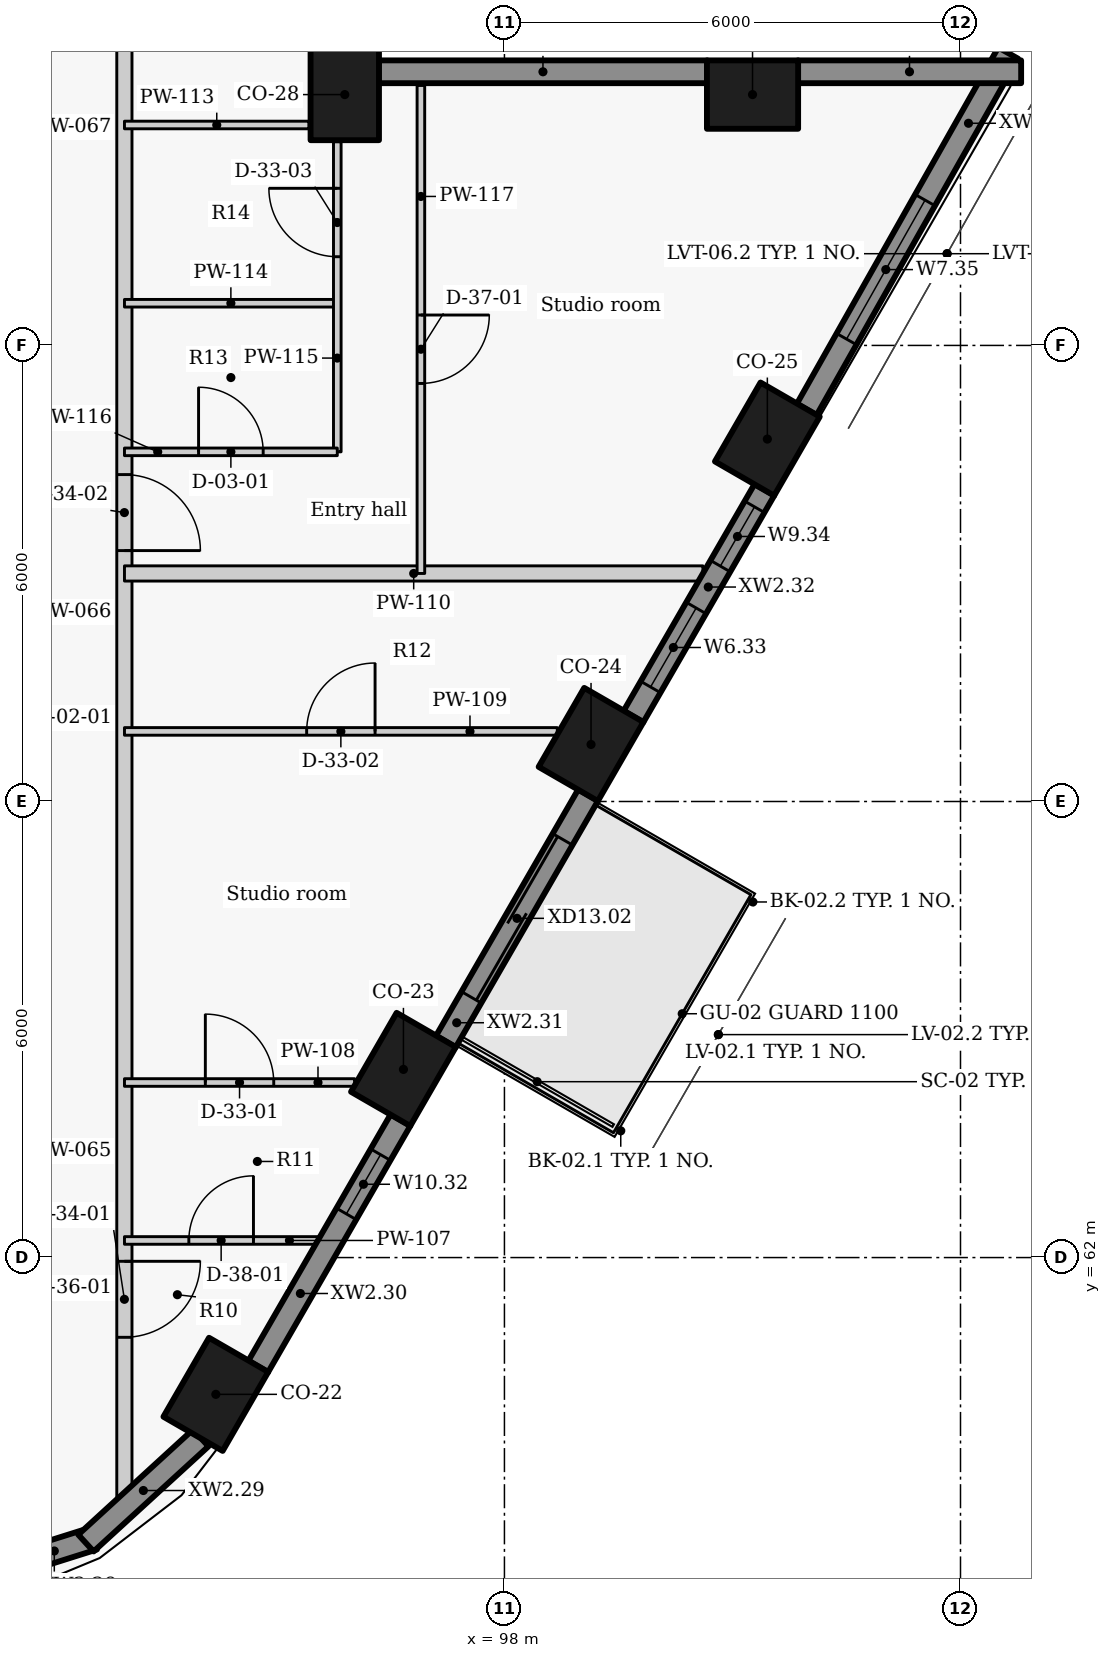
"""IFC4 building model, lengths in metres.
Left out: names, types, materials, properties, quantities, classifications, styles, units other than length and angle.
Written with IfcOpenShell. Run it as: python <this file> out.ifc"""

import sys

from ifc_helpers import new_model, si_unit, direction, frame, frame_2d, origin, origin_2d, place, context, subcontext, project, spatial, rectangle, extrude, element, fill, save


model = new_model("IFC4")
c1 = context("Model", 3, precision=1e-05, world=origin(), true_north=direction((0.0, 1.0)))
c2 = subcontext(c1, "Body", "Model", "MODEL_VIEW")
j1 = project(units=[si_unit("LENGTHUNIT", "METRE"), si_unit("PLANEANGLEUNIT", "RADIAN")], contexts=[c1])
p1 = place(None, origin())
s1 = spatial("IfcSite", under=j1, at=p1, CompositionType="ELEMENT")
p2 = place(p1, origin())
s2 = spatial("IfcBuilding", under=s1, at=p2, CompositionType="ELEMENT")
p3 = place(p2, frame((0.0, 0.0, 216.3)))
s3 = spatial("IfcBuildingStorey", under=s2, at=p3, CompositionType="ELEMENT", Elevation=216.3)
for number, where, z_axis, x_axis in (
    (1, (94.203, 60.2, 0.0), (0.0, 0.0, 1.0), (0.5, 0.866, 0.0)),
    (2, (96.671, 64.475, 0.0), (0.0, 0.0, 1.0), (0.5, 0.866, 0.0)),
    (3, (99.139, 68.75, 0.0), (0.0, 0.0, 1.0), (0.5, 0.866, 0.0)),
    (4, (101.459, 72.768, 0.0), (0.0, 0.0, 1.0), (0.5, 0.866, 0.0)),
    (5, (101.264, 77.3, 0.0), (0.0, 0.0, 1.0), (-1.0, 0.0, 0.0)),
    (6, (95.899, 77.3, 0.0), (0.0, 0.0, 1.0), (0.0, 1.0, 0.0)),
):
    element("IfcColumn", number, at=place(p3, frame(where, z_axis=z_axis, x_axis=x_axis)), inside=s3, PredefinedType="COLUMN", context=c2, shape_type="SweptSolid", body=[
        extrude(rectangle(XDim=1.2, YDim=0.9, at=origin_2d()), origin(), (0.0, 0.0, 1.0), 3.3),
    ])
p4 = place(p3, frame((90.636, 57.685, 0.0), z_axis=(0.0, 0.0, 1.0), x_axis=(0.95368324118, 0.300812691707, 0.0)))
e7 = element("IfcWall", 7, at=p4, inside=s3, PredefinedType="SOLIDWALL", context=c2, shape_type="SweptSolid", body=[
    extrude(rectangle(XDim=2.053, YDim=0.3, at=frame_2d((1.027, 0.0))), origin(), (0.0, 0.0, 1.0), 2.05),
])
p5 = place(p4, frame((0.271, 0.0, 0.9)))
e8 = element("IfcOpeningElement", 8, at=p5, cuts=e7, PredefinedType="OPENING", context=c2, shape_type="SweptSolid", body=[
    extrude(rectangle(XDim=0.6, YDim=1.1, at=frame_2d((0.3, 0.55))), frame((0.0, 0.16, 0.0), z_axis=(0.0, -1.0, 0.0), x_axis=(1.0, 0.0, 0.0)), (0.0, 0.0, 1.0), 0.32),
])
p6 = place(p3, frame((92.494, 58.244, 0.0), z_axis=(0.0, 0.0, 1.0), x_axis=(0.73764876128, 0.675184645102, 0.0)))
e9 = element("IfcWall", 9, at=p6, inside=s3, PredefinedType="SOLIDWALL", context=c2, shape_type="SweptSolid", body=[
    extrude(rectangle(XDim=2.048, YDim=0.3, at=frame_2d((1.024, 0.0))), origin(), (0.0, 0.0, 1.0), 2.05),
])
p7 = place(p3, frame((94.761, 60.567, 0.0), z_axis=(0.0, 0.0, 1.0), x_axis=(0.499982088007, 0.866035745032, 0.0)))
e10 = element("IfcWall", 10, at=p7, inside=s3, PredefinedType="SOLIDWALL", context=c2, shape_type="SweptSolid", body=[
    extrude(rectangle(XDim=3.744, YDim=0.3, at=frame_2d((1.872, 0.0))), origin(), (0.0, 0.0, 1.0), 2.05),
])
p8 = place(p7, frame((2.319, 0.0, 1.5)))
e11 = element("IfcOpeningElement", 11, at=p8, cuts=e10, PredefinedType="OPENING", context=c2, shape_type="SweptSolid", body=[
    extrude(rectangle(XDim=0.9, YDim=0.5, at=frame_2d((0.45, 0.25))), frame((0.0, 0.16, 0.0), z_axis=(0.0, -1.0, 0.0), x_axis=(1.0, 0.0, 0.0)), (0.0, 0.0, 1.0), 0.32),
])
p9 = place(p3, frame((97.229, 64.842, 0.0), z_axis=(0.0, 0.0, 1.0), x_axis=(0.500059225181, 0.86599120741, 0.0)))
e12 = element("IfcWall", 12, at=p9, inside=s3, PredefinedType="SOLIDWALL", context=c2, shape_type="SweptSolid", body=[
    extrude(rectangle(XDim=3.744, YDim=0.3, at=frame_2d((1.872, 0.0))), origin(), (0.0, 0.0, 1.0), 2.05),
])
p10 = place(p9, frame((0.672, 0.0, 0.0)))
e13 = element("IfcOpeningElement", 13, at=p10, cuts=e12, PredefinedType="OPENING", context=c2, shape_type="SweptSolid", body=[
    extrude(rectangle(XDim=2.4, YDim=2.0, at=frame_2d((1.2, 1.0))), frame((0.0, 0.16, 0.0), z_axis=(0.0, -1.0, 0.0), x_axis=(1.0, 0.0, 0.0)), (0.0, 0.0, 1.0), 0.32),
])
p11 = place(p3, frame((99.697, 69.116, 0.0), z_axis=(0.0, 0.0, 1.0), x_axis=(0.499955427682, 0.866051136095, 0.0)))
e14 = element("IfcWall", 14, at=p11, inside=s3, PredefinedType="SOLIDWALL", context=c2, shape_type="SweptSolid", body=[
    extrude(rectangle(XDim=3.447, YDim=0.3, at=frame_2d((1.724, 0.0))), origin(), (0.0, 0.0, 1.0), 2.05),
])
p12 = place(p11, frame((0.45, 0.0, 0.9)))
e15 = element("IfcOpeningElement", 15, at=p12, cuts=e14, PredefinedType="OPENING", context=c2, shape_type="SweptSolid", body=[
    extrude(rectangle(XDim=1.2, YDim=1.1, at=frame_2d((0.6, 0.55))), frame((0.0, 0.16, 0.0), z_axis=(0.0, -1.0, 0.0), x_axis=(1.0, 0.0, 0.0)), (0.0, 0.0, 1.0), 0.32),
])
p13 = place(p11, frame((2.287, 0.0, 0.9)))
e16 = element("IfcOpeningElement", 16, at=p13, cuts=e14, PredefinedType="OPENING", context=c2, shape_type="SweptSolid", body=[
    extrude(rectangle(XDim=0.9, YDim=1.1, at=frame_2d((0.45, 0.55))), frame((0.0, 0.16, 0.0), z_axis=(0.0, -1.0, 0.0), x_axis=(1.0, 0.0, 0.0)), (0.0, 0.0, 1.0), 0.32),
])
p14 = place(p3, frame((101.977, 73.157, 0.0), z_axis=(0.0, 0.0, 1.0), x_axis=(0.492033360928, 0.870576344575, 0.0)))
e17 = element("IfcWall", 17, at=p14, inside=s3, PredefinedType="SOLIDWALL", context=c2, shape_type="SweptSolid", body=[
    extrude(rectangle(XDim=5.387, YDim=0.3, at=frame_2d((2.693, 0.0))), origin(), (0.0, 0.0, 1.0), 2.05),
])
p15 = place(p14, frame((1.064, 0.0, 0.9)))
e18 = element("IfcOpeningElement", 18, at=p15, cuts=e17, PredefinedType="OPENING", context=c2, shape_type="SweptSolid", body=[
    extrude(rectangle(XDim=2.1, YDim=1.1, at=frame_2d((1.05, 0.55))), frame((0.0, 0.16, 0.0), z_axis=(0.0, -1.0, 0.0), x_axis=(1.0, 0.0, 0.0)), (0.0, 0.0, 1.0), 0.32),
])
p16 = place(p3, frame((104.798, 77.6, 0.0), z_axis=(0.0, 0.0, 1.0), x_axis=(-1.0, 0.0, 0.0)))
e19 = element("IfcWall", 19, at=p16, inside=s3, PredefinedType="SOLIDWALL", context=c2, shape_type="SweptSolid", body=[
    extrude(rectangle(XDim=2.938, YDim=0.3, at=frame_2d((1.469, 0.0))), origin(), (0.0, 0.0, 1.0), 2.05),
])
p17 = place(p3, frame((100.668, 77.6, 0.0), z_axis=(0.0, 0.0, 1.0), x_axis=(-1.0, 0.0, 0.0)))
e20 = element("IfcWall", 20, at=p17, inside=s3, PredefinedType="SOLIDWALL", context=c2, shape_type="SweptSolid", body=[
    extrude(rectangle(XDim=4.323, YDim=0.3, at=frame_2d((2.161, 0.0))), origin(), (0.0, 0.0, 1.0), 2.05),
])
p18 = place(p3, frame((93.0, 101.281, 0.0), z_axis=(0.0, 0.0, 1.0), x_axis=(0.0, -1.0, 0.0)))
e21 = element("IfcWall", 21, at=p18, inside=s3, PredefinedType="PARTITIONING", context=c2, shape_type="SweptSolid", body=[
    extrude(rectangle(XDim=42.606, YDim=0.2, at=frame_2d((21.303, 0.0))), origin(), (0.0, 0.0, 1.0), 2.03),
])
p19 = place(p18, frame((39.33, 0.0, 0.0)))
e22 = element("IfcOpeningElement", 22, at=p19, cuts=e21, PredefinedType="OPENING", context=c2, shape_type="SweptSolid", body=[
    extrude(rectangle(XDim=1.0, YDim=2.01, at=frame_2d((0.5, 1.005))), frame((0.0, 0.11, 0.0), z_axis=(0.0, -1.0, 0.0), x_axis=(1.0, 0.0, 0.0)), (0.0, 0.0, 1.0), 0.22),
])
p20 = place(p18, frame((28.98, 0.0, 0.0)))
e23 = element("IfcOpeningElement", 23, at=p20, cuts=e21, PredefinedType="OPENING", context=c2, shape_type="SweptSolid", body=[
    extrude(rectangle(XDim=1.0, YDim=2.01, at=frame_2d((0.5, 1.005))), frame((0.0, 0.11, 0.0), z_axis=(0.0, -1.0, 0.0), x_axis=(1.0, 0.0, 0.0)), (0.0, 0.0, 1.0), 0.22),
])
p21 = place(p18, frame((6.893, 0.0, 0.0)))
e24 = element("IfcOpeningElement", 24, at=p21, cuts=e21, PredefinedType="OPENING", context=c2, shape_type="SweptSolid", body=[
    extrude(rectangle(XDim=1.0, YDim=2.01, at=frame_2d((0.5, 1.005))), frame((0.0, 0.11, 0.0), z_axis=(0.0, -1.0, 0.0), x_axis=(1.0, 0.0, 0.0)), (0.0, 0.0, 1.0), 0.22),
])
p22 = place(p18, frame((19.08, 0.0, 0.0)))
e25 = element("IfcOpeningElement", 25, at=p22, cuts=e21, PredefinedType="OPENING", context=c2, shape_type="SweptSolid", body=[
    extrude(rectangle(XDim=1.0, YDim=2.01, at=frame_2d((0.5, 1.005))), frame((0.0, 0.11, 0.0), z_axis=(0.0, -1.0, 0.0), x_axis=(1.0, 0.0, 0.0)), (0.0, 0.0, 1.0), 0.22),
])
p23 = place(p3, frame((93.001, 62.225, 0.0), z_axis=(0.0, 0.0, 1.0), x_axis=(1.0, 0.0, 0.0)))
e26 = element("IfcWall", 26, at=p23, inside=s3, PredefinedType="PARTITIONING", context=c2, shape_type="SweptSolid", body=[
    extrude(rectangle(XDim=2.544, YDim=0.1, at=frame_2d((1.272, 0.0))), origin(), (0.0, 0.0, 1.0), 2.03),
])
p24 = place(p23, frame((0.847, 0.0, 0.0)))
e27 = element("IfcOpeningElement", 27, at=p24, cuts=e26, PredefinedType="OPENING", context=c2, shape_type="SweptSolid", body=[
    extrude(rectangle(XDim=0.85, YDim=2.01, at=frame_2d((0.425, 1.005))), frame((0.0, 0.06, 0.0), z_axis=(0.0, -1.0, 0.0), x_axis=(1.0, 0.0, 0.0)), (0.0, 0.0, 1.0), 0.12),
])
p25 = place(p3, frame((93.001, 64.303, 0.0), z_axis=(0.0, 0.0, 1.0), x_axis=(1.0, 0.0, 0.0)))
e28 = element("IfcWall", 28, at=p25, inside=s3, PredefinedType="PARTITIONING", context=c2, shape_type="SweptSolid", body=[
    extrude(rectangle(XDim=3.028, YDim=0.1, at=frame_2d((1.514, 0.0))), origin(), (0.0, 0.0, 1.0), 2.95),
])
p26 = place(p25, frame((1.064, 0.0, 0.0)))
e29 = element("IfcOpeningElement", 29, at=p26, cuts=e28, PredefinedType="OPENING", context=c2, shape_type="SweptSolid", body=[
    extrude(rectangle(XDim=0.9, YDim=2.1, at=frame_2d((0.45, 1.05))), frame((0.0, 0.06, 0.0), z_axis=(0.0, -1.0, 0.0), x_axis=(1.0, 0.0, 0.0)), (0.0, 0.0, 1.0), 0.12),
])
p27 = place(p3, frame((93.001, 68.922, 0.0), z_axis=(0.0, 0.0, 1.0), x_axis=(1.0, 0.0, 0.0)))
e30 = element("IfcWall", 30, at=p27, inside=s3, PredefinedType="PARTITIONING", context=c2, shape_type="SweptSolid", body=[
    extrude(rectangle(XDim=5.695, YDim=0.1, at=frame_2d((2.847, 0.0))), origin(), (0.0, 0.0, 1.0), 2.95),
])
p28 = place(p27, frame((2.397, 0.0, 0.0)))
e31 = element("IfcOpeningElement", 31, at=p28, cuts=e30, PredefinedType="OPENING", context=c2, shape_type="SweptSolid", body=[
    extrude(rectangle(XDim=0.9, YDim=2.1, at=frame_2d((0.45, 1.05))), frame((0.0, 0.06, 0.0), z_axis=(0.0, -1.0, 0.0), x_axis=(1.0, 0.0, 0.0)), (0.0, 0.0, 1.0), 0.12),
])
p29 = place(p3, frame((93.001, 71.0, 0.0), z_axis=(0.0, 0.0, 1.0), x_axis=(1.0, 0.0, 0.0)))
e32 = element("IfcWall", 32, at=p29, inside=s3, PredefinedType="PARTITIONING", context=c2, shape_type="SweptSolid", body=[
    extrude(rectangle(XDim=7.61, YDim=0.2, at=frame_2d((3.805, 0.0))), origin(), (0.0, 0.0, 1.0), 2.03),
])
p30 = place(p3, frame((93.001, 76.9, 0.0), z_axis=(0.0, 0.0, 1.0), x_axis=(1.0, 0.0, 0.0)))
e33 = element("IfcWall", 33, at=p30, inside=s3, PredefinedType="PARTITIONING", context=c2, shape_type="SweptSolid", body=[
    extrude(rectangle(XDim=2.428, YDim=0.1, at=frame_2d((1.214, 0.0))), origin(), (0.0, 0.0, 1.0), 2.95),
])
p31 = place(p3, frame((93.001, 74.555, 0.0), z_axis=(0.0, 0.0, 1.0), x_axis=(1.0, 0.0, 0.0)))
e34 = element("IfcWall", 34, at=p31, inside=s3, PredefinedType="PARTITIONING", context=c2, shape_type="SweptSolid", body=[
    extrude(rectangle(XDim=2.8, YDim=0.1, at=frame_2d((1.4, 0.0))), origin(), (0.0, 0.0, 1.0), 2.95),
])
p32 = place(p3, frame((95.801, 72.6, 0.0), z_axis=(0.0, 0.0, 1.0), x_axis=(0.0, 1.0, 0.0)))
e35 = element("IfcWall", 35, at=p32, inside=s3, PredefinedType="PARTITIONING", context=c2, shape_type="SweptSolid", body=[
    extrude(rectangle(XDim=4.08, YDim=0.1, at=frame_2d((2.04, 0.0))), origin(), (0.0, 0.0, 1.0), 2.95),
])
p33 = place(p32, frame((2.567, 0.0, 0.0)))
e36 = element("IfcOpeningElement", 36, at=p33, cuts=e35, PredefinedType="OPENING", context=c2, shape_type="SweptSolid", body=[
    extrude(rectangle(XDim=0.9, YDim=2.1, at=frame_2d((0.45, 1.05))), frame((0.0, 0.06, 0.0), z_axis=(0.0, -1.0, 0.0), x_axis=(1.0, 0.0, 0.0)), (0.0, 0.0, 1.0), 0.12),
])
p34 = place(p3, frame((93.001, 72.6, 0.0), z_axis=(0.0, 0.0, 1.0), x_axis=(1.0, 0.0, 0.0)))
e37 = element("IfcWall", 37, at=p34, inside=s3, PredefinedType="PARTITIONING", context=c2, shape_type="SweptSolid", body=[
    extrude(rectangle(XDim=2.8, YDim=0.1, at=frame_2d((1.4, 0.0))), origin(), (0.0, 0.0, 1.0), 2.95),
])
p35 = place(p34, frame((0.975, 0.0, 0.0)))
e38 = element("IfcOpeningElement", 38, at=p35, cuts=e37, PredefinedType="OPENING", context=c2, shape_type="SweptSolid", body=[
    extrude(rectangle(XDim=0.85, YDim=2.1, at=frame_2d((0.425, 1.05))), frame((0.0, 0.06, 0.0), z_axis=(0.0, -1.0, 0.0), x_axis=(1.0, 0.0, 0.0)), (0.0, 0.0, 1.0), 0.12),
])
p36 = place(p3, frame((96.901, 77.42, 0.0), z_axis=(0.0, 0.0, 1.0), x_axis=(0.0, -1.0, 0.0)))
e39 = element("IfcWall", 39, at=p36, inside=s3, PredefinedType="PARTITIONING", context=c2, shape_type="SweptSolid", body=[
    extrude(rectangle(XDim=6.42, YDim=0.1, at=frame_2d((3.21, 0.0))), origin(), (0.0, 0.0, 1.0), 2.03),
])
p37 = place(p36, frame((3.02, 0.0, 0.0)))
e40 = element("IfcOpeningElement", 40, at=p37, cuts=e39, PredefinedType="OPENING", context=c2, shape_type="SweptSolid", body=[
    extrude(rectangle(XDim=0.9, YDim=2.01, at=frame_2d((0.45, 1.005))), frame((0.0, 0.06, 0.0), z_axis=(0.0, -1.0, 0.0), x_axis=(1.0, 0.0, 0.0)), (0.0, 0.0, 1.0), 0.12),
])
p38 = place(p8, origin())
e41 = element("IfcWindow", 41, at=p38, inside=s3, PartitioningType="SINGLE_PANEL", PredefinedType="WINDOW", context=c2, shape_type="SweptSolid", body=[
    extrude(rectangle(XDim=0.9, YDim=0.5, at=frame_2d((0.45, 0.25))), frame((0.0, 0.03, 0.0), z_axis=(0.0, -1.0, 0.0), x_axis=(1.0, 0.0, 0.0)), (0.0, 0.0, 1.0), 0.06),
])
fill(e11, e41)
p39 = place(p10, origin())
e42 = element("IfcDoor", 42, at=p39, inside=s3, OperationType="DOUBLE_DOOR_SLIDING", PredefinedType="DOOR", context=c2, shape_type="SweptSolid", body=[
    extrude(rectangle(XDim=2.4, YDim=2.0, at=frame_2d((1.2, 1.0))), frame((0.0, 0.025, 0.0), z_axis=(0.0, -1.0, 0.0), x_axis=(1.0, 0.0, 0.0)), (0.0, 0.0, 1.0), 0.05),
])
fill(e13, e42)
p40 = place(p12, origin())
e43 = element("IfcWindow", 43, at=p40, inside=s3, PartitioningType="SINGLE_PANEL", PredefinedType="WINDOW", context=c2, shape_type="SweptSolid", body=[
    extrude(rectangle(XDim=1.2, YDim=1.1, at=frame_2d((0.6, 0.55))), frame((0.0, 0.03, 0.0), z_axis=(0.0, -1.0, 0.0), x_axis=(1.0, 0.0, 0.0)), (0.0, 0.0, 1.0), 0.06),
])
fill(e15, e43)
p41 = place(p13, origin())
e44 = element("IfcWindow", 44, at=p41, inside=s3, PartitioningType="SINGLE_PANEL", PredefinedType="WINDOW", context=c2, shape_type="SweptSolid", body=[
    extrude(rectangle(XDim=0.9, YDim=1.1, at=frame_2d((0.45, 0.55))), frame((0.0, 0.03, 0.0), z_axis=(0.0, -1.0, 0.0), x_axis=(1.0, 0.0, 0.0)), (0.0, 0.0, 1.0), 0.06),
])
fill(e16, e44)
p42 = place(p15, origin())
e45 = element("IfcWindow", 45, at=p42, inside=s3, PartitioningType="SINGLE_PANEL", PredefinedType="WINDOW", context=c2, shape_type="SweptSolid", body=[
    extrude(rectangle(XDim=2.1, YDim=1.1, at=frame_2d((1.05, 0.55))), frame((0.0, 0.03, 0.0), z_axis=(0.0, -1.0, 0.0), x_axis=(1.0, 0.0, 0.0)), (0.0, 0.0, 1.0), 0.06),
])
fill(e18, e45)
p43 = place(p19, origin())
e46 = element("IfcDoor", 46, at=p43, inside=s3, OperationType="SINGLE_SWING_LEFT", PredefinedType="DOOR", context=c2, shape_type="SweptSolid", body=[
    extrude(rectangle(XDim=1.0, YDim=2.01, at=frame_2d((0.5, 1.005))), frame((0.0, 0.025, 0.0), z_axis=(0.0, -1.0, 0.0), x_axis=(1.0, 0.0, 0.0)), (0.0, 0.0, 1.0), 0.05),
])
fill(e22, e46)
p44 = place(p24, origin())
e47 = element("IfcDoor", 47, at=p44, inside=s3, OperationType="SINGLE_SWING_RIGHT", PredefinedType="DOOR", context=c2, shape_type="SweptSolid", body=[
    extrude(rectangle(XDim=0.85, YDim=2.01, at=frame_2d((0.425, 1.005))), frame((0.0, 0.025, 0.0), z_axis=(0.0, -1.0, 0.0), x_axis=(1.0, 0.0, 0.0)), (0.0, 0.0, 1.0), 0.05),
])
fill(e27, e47)
p45 = place(p26, origin())
e48 = element("IfcDoor", 48, at=p45, inside=s3, OperationType="SINGLE_SWING_LEFT", PredefinedType="DOOR", context=c2, shape_type="SweptSolid", body=[
    extrude(rectangle(XDim=0.9, YDim=2.1, at=frame_2d((0.45, 1.05))), frame((0.0, 0.025, 0.0), z_axis=(0.0, -1.0, 0.0), x_axis=(1.0, 0.0, 0.0)), (0.0, 0.0, 1.0), 0.05),
])
fill(e29, e48)
p46 = place(p28, origin())
e49 = element("IfcDoor", 49, at=p46, inside=s3, OperationType="SINGLE_SWING_RIGHT", PredefinedType="DOOR", context=c2, shape_type="SweptSolid", body=[
    extrude(rectangle(XDim=0.9, YDim=2.1, at=frame_2d((0.45, 1.05))), frame((0.0, 0.025, 0.0), z_axis=(0.0, -1.0, 0.0), x_axis=(1.0, 0.0, 0.0)), (0.0, 0.0, 1.0), 0.05),
])
fill(e31, e49)
p47 = place(p20, origin())
e50 = element("IfcDoor", 50, at=p47, inside=s3, OperationType="SINGLE_SWING_RIGHT", PredefinedType="DOOR", context=c2, shape_type="SweptSolid", body=[
    extrude(rectangle(XDim=1.0, YDim=2.01, at=frame_2d((0.5, 1.005))), frame((0.0, 0.025, 0.0), z_axis=(0.0, -1.0, 0.0), x_axis=(1.0, 0.0, 0.0)), (0.0, 0.0, 1.0), 0.05),
])
fill(e23, e50)
p48 = place(p35, origin())
e51 = element("IfcDoor", 51, at=p48, inside=s3, OperationType="SINGLE_SWING_LEFT", PredefinedType="DOOR", context=c2, shape_type="SweptSolid", body=[
    extrude(rectangle(XDim=0.85, YDim=2.1, at=frame_2d((0.425, 1.05))), frame((0.0, 0.025, 0.0), z_axis=(0.0, -1.0, 0.0), x_axis=(1.0, 0.0, 0.0)), (0.0, 0.0, 1.0), 0.05),
])
fill(e38, e51)
p49 = place(p33, origin())
e52 = element("IfcDoor", 52, at=p49, inside=s3, OperationType="SINGLE_SWING_RIGHT", PredefinedType="DOOR", context=c2, shape_type="SweptSolid", body=[
    extrude(rectangle(XDim=0.9, YDim=2.1, at=frame_2d((0.45, 1.05))), frame((0.0, 0.025, 0.0), z_axis=(0.0, -1.0, 0.0), x_axis=(1.0, 0.0, 0.0)), (0.0, 0.0, 1.0), 0.05),
])
fill(e36, e52)
p50 = place(p37, origin())
e53 = element("IfcDoor", 53, at=p50, inside=s3, OperationType="SINGLE_SWING_LEFT", PredefinedType="DOOR", context=c2, shape_type="SweptSolid", body=[
    extrude(rectangle(XDim=0.9, YDim=2.01, at=frame_2d((0.45, 1.005))), frame((0.0, 0.025, 0.0), z_axis=(0.0, -1.0, 0.0), x_axis=(1.0, 0.0, 0.0)), (0.0, 0.0, 1.0), 0.05),
])
fill(e40, e53)
save(model, sys.argv[1])
